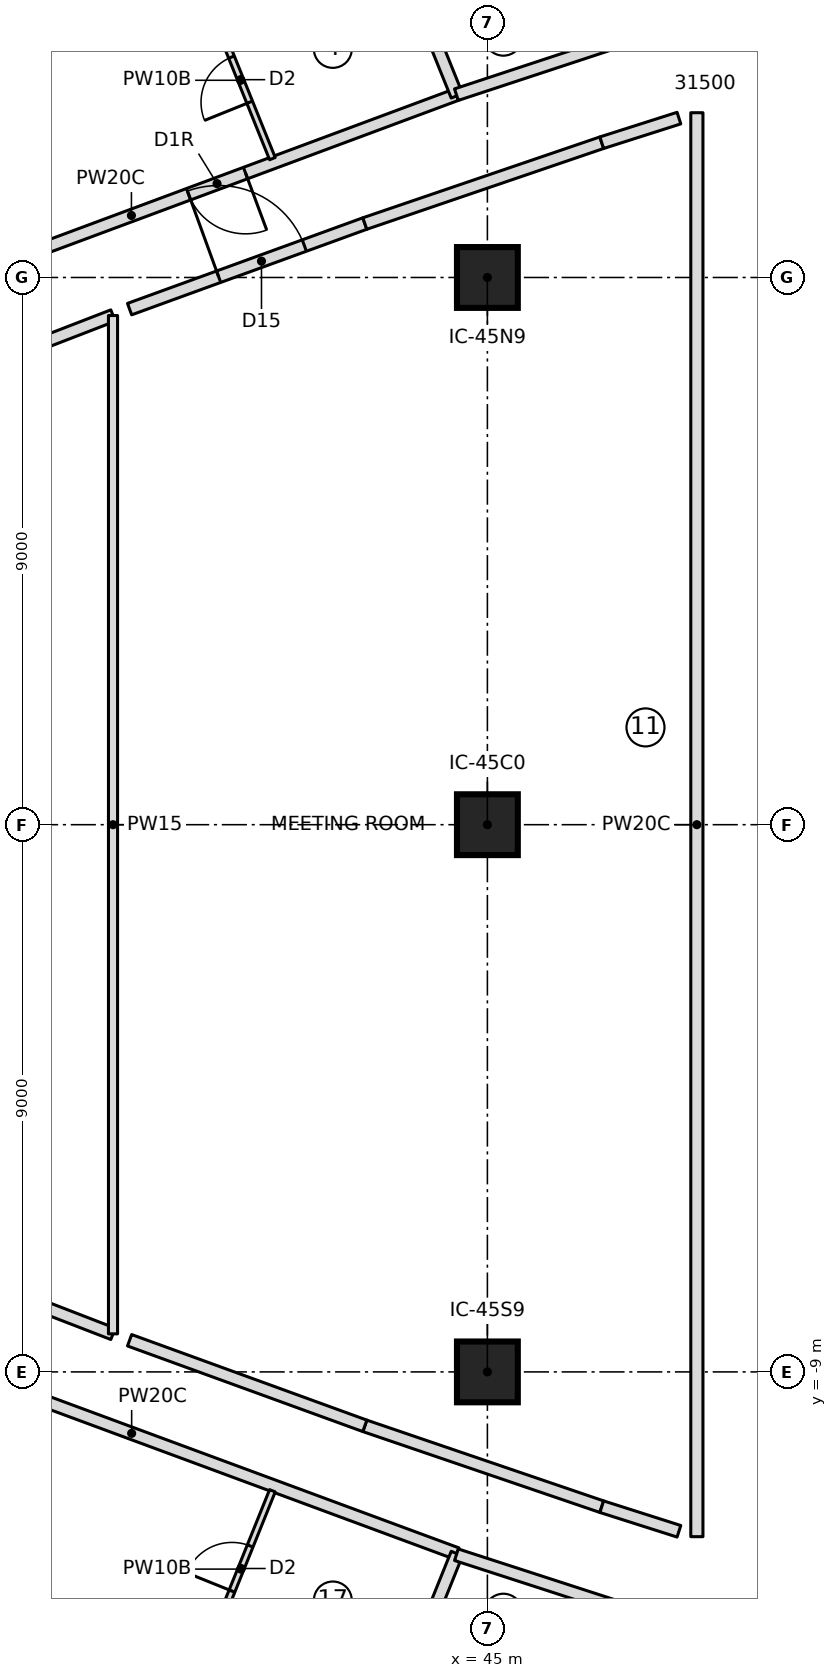
"""IFC4 building model, lengths in metres.
Left out: names, types, materials, properties, quantities, classifications, styles, units other than length and angle.
Written with IfcOpenShell. Run it as: python <this file> out.ifc"""

import sys

from ifc_helpers import new_model, si_unit, direction, frame, frame_2d, origin, origin_2d, place, context, subcontext, project, spatial, rectangle, extrude, element, fill, save


model = new_model("IFC4")
c1 = context("Model", 3, precision=1e-05, world=origin(), true_north=direction((0.0, 1.0)))
c2 = subcontext(c1, "Body", "Model", "MODEL_VIEW")
j1 = project(units=[si_unit("LENGTHUNIT", "METRE"), si_unit("PLANEANGLEUNIT", "RADIAN")], contexts=[c1])
p1 = place(None, origin())
s1 = spatial("IfcSite", under=j1, at=p1, CompositionType="ELEMENT")
p2 = place(p1, origin())
s2 = spatial("IfcBuilding", under=s1, at=p2, CompositionType="ELEMENT")
p3 = place(p2, frame((0.0, 0.0, 189.7)))
s3 = spatial("IfcBuildingStorey", under=s2, at=p3, CompositionType="ELEMENT", Elevation=189.7)
for number, where, z_axis, x_axis in (
    (1, (45.0, -9.0, 0.0), (0.0, 0.0, 1.0), (1.0, 0.0, 0.0)),
    (2, (45.0, 0.0, 0.0), (0.0, 0.0, 1.0), (1.0, 0.0, 0.0)),
    (3, (45.0, 9.0, 0.0), (0.0, 0.0, 1.0), (1.0, 0.0, 0.0)),
):
    element("IfcColumn", number, at=place(p3, frame(where, z_axis=z_axis, x_axis=x_axis)), inside=s3, PredefinedType="COLUMN", context=c2, shape_type="SweptSolid", body=[
        extrude(rectangle(XDim=1.0, YDim=1.0, at=origin_2d()), origin(), (0.0, 0.0, 1.0), 3.55),
    ])
p4 = place(p3, frame((44.49, 12.007, 0.0), z_axis=(0.0, 0.0, 1.0), x_axis=(-0.937301234234, -0.348520295396, 0.0)))
e4 = element("IfcWall", 4, at=p4, inside=s3, PredefinedType="PARTITIONING", context=c2, shape_type="SweptSolid", body=[
    extrude(rectangle(XDim=11.404, YDim=0.2, at=frame_2d((5.702, 0.0))), origin(), (0.0, 0.0, 1.0), 3.25),
])
p5 = place(p4, frame((3.7, 0.0, 0.0)))
e5 = element("IfcOpeningElement", 5, at=p5, cuts=e4, PredefinedType="OPENING", context=c2, shape_type="SweptSolid", body=[
    extrude(rectangle(XDim=1.0, YDim=2.1, at=frame_2d((0.5, 1.05))), frame((0.0, 0.11, 0.0), z_axis=(0.0, -1.0, 0.0), x_axis=(1.0, 0.0, 0.0)), (0.0, 0.0, 1.0), 0.22),
])
p6 = place(p3, frame((41.464, 10.955, 0.0), z_axis=(0.0, 0.0, 1.0), x_axis=(-0.373889095325, 0.927473419779, 0.0)))
e6 = element("IfcWall", 6, at=p6, inside=s3, PredefinedType="PARTITIONING", context=c2, shape_type="SweptSolid", body=[
    extrude(rectangle(XDim=2.778, YDim=0.1, at=frame_2d((1.389, 0.0))), origin(), (0.0, 0.0, 1.0), 3.25),
])
p7 = place(p6, frame((1.0, 0.0, 0.0)))
e7 = element("IfcOpeningElement", 7, at=p7, cuts=e6, PredefinedType="OPENING", context=c2, shape_type="SweptSolid", body=[
    extrude(rectangle(XDim=0.8, YDim=2.1, at=frame_2d((0.4, 1.05))), frame((0.0, 0.06, 0.0), z_axis=(0.0, -1.0, 0.0), x_axis=(1.0, 0.0, 0.0)), (0.0, 0.0, 1.0), 0.12),
])
p8 = place(p3, frame((44.498, 11.988, 0.0), z_axis=(0.0, 0.0, 1.0), x_axis=(-0.373877998371, 0.927477893178, 0.0)))
e8 = element("IfcWall", 8, at=p8, inside=s3, PredefinedType="PARTITIONING", context=c2, shape_type="SweptSolid", body=[
    extrude(rectangle(XDim=7.611, YDim=0.2, at=frame_2d((3.806, 0.0))), origin(), (0.0, 0.0, 1.0), 3.25),
])
p9 = place(p3, frame((33.801, -8.032, 0.0), z_axis=(0.0, 0.0, 1.0), x_axis=(0.937916242759, -0.346861819127, 0.0)))
e9 = element("IfcWall", 9, at=p9, inside=s3, PredefinedType="PARTITIONING", context=c2, shape_type="SweptSolid", body=[
    extrude(rectangle(XDim=11.405, YDim=0.2, at=frame_2d((5.702, 0.0))), origin(), (0.0, 0.0, 1.0), 3.25),
])
p10 = place(p9, frame((1.15, 0.0, 0.0)))
e10 = element("IfcOpeningElement", 10, at=p10, cuts=e9, PredefinedType="OPENING", context=c2, shape_type="SweptSolid", body=[
    extrude(rectangle(XDim=1.0, YDim=2.1, at=frame_2d((0.5, 1.05))), frame((0.0, 0.11, 0.0), z_axis=(0.0, -1.0, 0.0), x_axis=(1.0, 0.0, 0.0)), (0.0, 0.0, 1.0), 0.22),
])
p11 = place(p3, frame((40.426, -13.532, 0.0), z_axis=(0.0, 0.0, 1.0), x_axis=(0.373889095325, 0.927473419779, 0.0)))
e11 = element("IfcWall", 11, at=p11, inside=s3, PredefinedType="PARTITIONING", context=c2, shape_type="SweptSolid", body=[
    extrude(rectangle(XDim=2.778, YDim=0.1, at=frame_2d((1.389, 0.0))), origin(), (0.0, 0.0, 1.0), 3.25),
])
p12 = place(p11, frame((1.0, 0.0, 0.0)))
e12 = element("IfcOpeningElement", 12, at=p12, cuts=e11, PredefinedType="OPENING", context=c2, shape_type="SweptSolid", body=[
    extrude(rectangle(XDim=0.8, YDim=2.1, at=frame_2d((0.4, 1.05))), frame((0.0, 0.06, 0.0), z_axis=(0.0, -1.0, 0.0), x_axis=(1.0, 0.0, 0.0)), (0.0, 0.0, 1.0), 0.12),
])
p13 = place(p3, frame((41.652, -19.048, 0.0), z_axis=(0.0, 0.0, 1.0), x_axis=(0.373877998371, 0.927477893178, 0.0)))
e13 = element("IfcWall", 13, at=p13, inside=s3, PredefinedType="PARTITIONING", context=c2, shape_type="SweptSolid", body=[
    extrude(rectangle(XDim=7.611, YDim=0.2, at=frame_2d((3.806, 0.0))), origin(), (0.0, 0.0, 1.0), 3.25),
])
p14 = place(p3, frame((35.276, 6.994, 0.0), z_axis=(0.0, 0.0, 1.0), x_axis=(0.932681040007, 0.360702200731, 0.0)))
e14 = element("IfcWall", 14, at=p14, inside=s3, PredefinedType="PARTITIONING", context=c2, shape_type="SweptSolid", body=[
    extrude(rectangle(XDim=3.825, YDim=0.2, at=frame_2d((1.913, 0.0))), origin(), (0.0, 0.0, 1.0), 3.25),
])
p15 = place(p14, frame((1.413, 0.0, 0.0)))
e15 = element("IfcOpeningElement", 15, at=p15, cuts=e14, PredefinedType="OPENING", context=c2, shape_type="SweptSolid", body=[
    extrude(rectangle(XDim=1.0, YDim=2.1, at=frame_2d((0.5, 1.05))), frame((0.0, 0.11, 0.0), z_axis=(0.0, -1.0, 0.0), x_axis=(1.0, 0.0, 0.0)), (0.0, 0.0, 1.0), 0.22),
])
p16 = place(p3, frame((38.843, -8.374, 0.0), z_axis=(0.0, 0.0, 1.0), x_axis=(-0.932681040007, 0.360702200731, 0.0)))
e16 = element("IfcWall", 16, at=p16, inside=s3, PredefinedType="PARTITIONING", context=c2, shape_type="SweptSolid", body=[
    extrude(rectangle(XDim=3.825, YDim=0.2, at=frame_2d((1.913, 0.0))), origin(), (0.0, 0.0, 1.0), 3.25),
])
p17 = place(p3, frame((38.843, -8.374, 0.0), z_axis=(0.0, 0.0, 1.0), x_axis=(0.0, 1.0, 0.0)))
e17 = element("IfcWall", 17, at=p17, inside=s3, PredefinedType="PARTITIONING", context=c2, shape_type="SweptSolid", body=[
    extrude(rectangle(XDim=16.748, YDim=0.15, at=frame_2d((8.374, 0.0))), origin(), (0.0, 0.0, 1.0), 3.25),
])
p18 = place(p3, frame((39.115, 8.479, 0.0), z_axis=(0.0, 0.0, 1.0), x_axis=(0.939727613335, 0.341923986779, 0.0)))
e18 = element("IfcWall", 18, at=p18, inside=s3, PredefinedType="PARTITIONING", context=c2, shape_type="SweptSolid", body=[
    extrude(rectangle(XDim=4.117, YDim=0.2, at=frame_2d((2.059, 0.0))), origin(), (0.0, 0.0, 1.0), 3.25),
])
p19 = place(p18, frame((1.559, 0.0, 0.0)))
e19 = element("IfcOpeningElement", 19, at=p19, cuts=e18, PredefinedType="OPENING", context=c2, shape_type="SweptSolid", body=[
    extrude(rectangle(XDim=1.5, YDim=2.1, at=frame_2d((0.75, 1.05))), frame((0.0, 0.11, 0.0), z_axis=(0.0, -1.0, 0.0), x_axis=(1.0, 0.0, 0.0)), (0.0, 0.0, 1.0), 0.22),
])
for number, where, z_axis, x_axis in (
    (20, (42.984, 9.887, 0.0), (0.0, 0.0, 1.0), (0.946, 0.323, 0.0)),
    (21, (46.881, -11.217, 0.0), (0.0, 0.0, 1.0), (-0.946, 0.323, 0.0)),
    (22, (42.984, -9.887, 0.0), (0.0, 0.0, 1.0), (-0.94, 0.342, 0.0)),
):
    element("IfcWall", number, at=place(p3, frame(where, z_axis=z_axis, x_axis=x_axis)), inside=s3, PredefinedType="PARTITIONING", context=c2, shape_type="SweptSolid", body=[
        extrude(rectangle(XDim=4.117, YDim=0.2, at=frame_2d((2.059, 0.0))), origin(), (0.0, 0.0, 1.0), 3.25),
    ])
p20 = place(p3, frame((48.15, 13.213, 0.0), z_axis=(0.0, 0.0, 1.0), x_axis=(-0.949729856115, -0.313070599711, 0.0)))
e23 = element("IfcWall", 23, at=p20, inside=s3, PredefinedType="PARTITIONING", context=c2, shape_type="SweptSolid", body=[
    extrude(rectangle(XDim=3.853, YDim=0.2, at=frame_2d((1.927, 0.0))), origin(), (0.0, 0.0, 1.0), 3.25),
])
p21 = place(p3, frame((44.49, -12.007, 0.0), z_axis=(0.0, 0.0, 1.0), x_axis=(0.951228355446, -0.308487626648, 0.0)))
e24 = element("IfcWall", 24, at=p21, inside=s3, PredefinedType="PARTITIONING", context=c2, shape_type="SweptSolid", body=[
    extrude(rectangle(XDim=3.847, YDim=0.2, at=frame_2d((1.924, 0.0))), origin(), (0.0, 0.0, 1.0), 3.25),
])
for number, where, z_axis, x_axis in (
    (25, (46.881, 11.217, 0.0), (0.0, 0.0, 1.0), (0.953, 0.304, 0.0)),
    (26, (48.15, -11.621, 0.0), (0.0, 0.0, 1.0), (-0.953, 0.304, 0.0)),
):
    element("IfcWall", number, at=place(p3, frame(where, z_axis=z_axis, x_axis=x_axis)), inside=s3, PredefinedType="PARTITIONING", context=c2, shape_type="SweptSolid", body=[
        extrude(rectangle(XDim=1.332, YDim=0.2, at=frame_2d((0.666, 0.0))), origin(), (0.0, 0.0, 1.0), 3.25),
    ])
p22 = place(p3, frame((48.445, 11.71, 0.0), z_axis=(0.0, 0.0, 1.0), x_axis=(0.0, -1.0, 0.0)))
e27 = element("IfcWall", 27, at=p22, inside=s3, PredefinedType="PARTITIONING", context=c2, shape_type="SweptSolid", body=[
    extrude(rectangle(XDim=23.42, YDim=0.2, at=frame_2d((11.71, 0.0))), origin(), (0.0, 0.0, 1.0), 3.25),
])
p23 = place(p7, origin())
e28 = element("IfcDoor", 28, at=p23, inside=s3, OperationType="SINGLE_SWING_LEFT", PredefinedType="DOOR", context=c2, shape_type="SweptSolid", body=[
    extrude(rectangle(XDim=0.8, YDim=2.1, at=frame_2d((0.4, 1.05))), frame((0.0, 0.025, 0.0), z_axis=(0.0, -1.0, 0.0), x_axis=(1.0, 0.0, 0.0)), (0.0, 0.0, 1.0), 0.05),
])
fill(e7, e28)
p24 = place(p5, origin())
e29 = element("IfcDoor", 29, at=p24, inside=s3, OperationType="SINGLE_SWING_RIGHT", PredefinedType="DOOR", context=c2, shape_type="SweptSolid", body=[
    extrude(rectangle(XDim=1.0, YDim=2.1, at=frame_2d((0.5, 1.05))), frame((0.0, 0.025, 0.0), z_axis=(0.0, -1.0, 0.0), x_axis=(1.0, 0.0, 0.0)), (0.0, 0.0, 1.0), 0.05),
])
fill(e5, e29)
p25 = place(p12, origin())
e30 = element("IfcDoor", 30, at=p25, inside=s3, OperationType="SINGLE_SWING_LEFT", PredefinedType="DOOR", context=c2, shape_type="SweptSolid", body=[
    extrude(rectangle(XDim=0.8, YDim=2.1, at=frame_2d((0.4, 1.05))), frame((0.0, 0.025, 0.0), z_axis=(0.0, -1.0, 0.0), x_axis=(1.0, 0.0, 0.0)), (0.0, 0.0, 1.0), 0.05),
])
fill(e12, e30)
p26 = place(p19, origin())
e31 = element("IfcDoor", 31, at=p26, inside=s3, OperationType="DOUBLE_DOOR_SINGLE_SWING", PredefinedType="DOOR", context=c2, shape_type="SweptSolid", body=[
    extrude(rectangle(XDim=1.5, YDim=2.1, at=frame_2d((0.75, 1.05))), frame((0.0, 0.025, 0.0), z_axis=(0.0, -1.0, 0.0), x_axis=(1.0, 0.0, 0.0)), (0.0, 0.0, 1.0), 0.05),
])
fill(e19, e31)
save(model, sys.argv[1])
